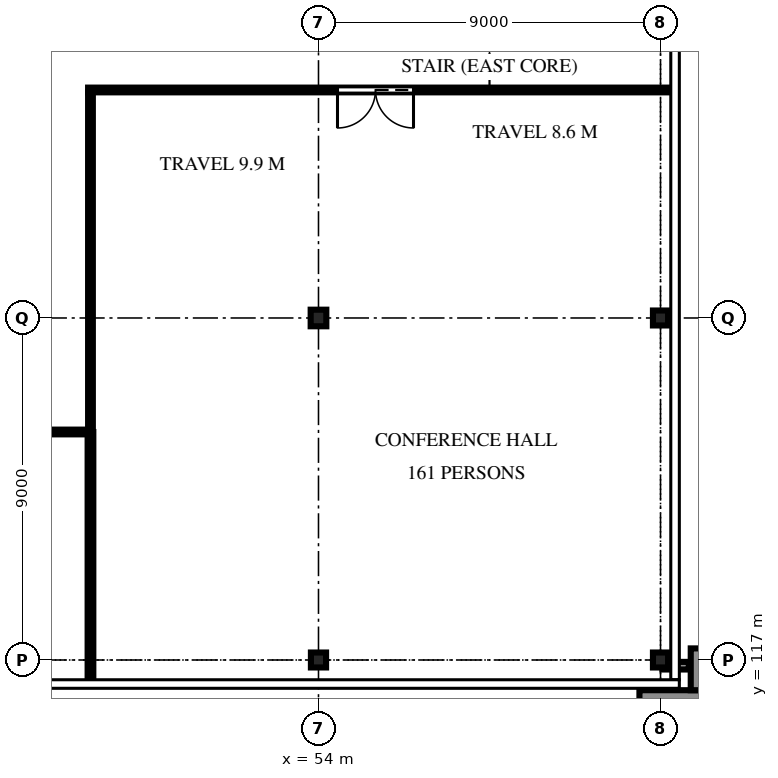
"""IFC4 building model, lengths in metres.
Left out: names, types, materials, properties, quantities, classifications, styles, units other than length and angle.
Written with IfcOpenShell. Run it as: python <this file> out.ifc"""

import sys

from ifc_helpers import new_model, si_unit, direction, frame, frame_2d, origin, origin_2d, place, context, subcontext, project, spatial, polyline, rectangle, i_section, outline, extrude, element, fill, save


model = new_model("IFC4")
c1 = context("Model", 3, precision=1e-05, world=origin(), true_north=direction((0.0, 1.0)))
c2 = subcontext(c1, "Body", "Model", "MODEL_VIEW")
j1 = project(units=[si_unit("LENGTHUNIT", "METRE"), si_unit("PLANEANGLEUNIT", "RADIAN")], contexts=[c1])
p1 = place(None, origin())
s1 = spatial("IfcSite", under=j1, at=p1, CompositionType="ELEMENT")
p2 = place(p1, origin())
s2 = spatial("IfcBuilding", under=s1, at=p2, CompositionType="ELEMENT")
p3 = place(p2, frame((0.0, 0.0, 7.5)))
s3 = spatial("IfcBuildingStorey", under=s2, at=p3, CompositionType="ELEMENT", Elevation=7.5)
p4 = place(p3, frame((54.0, 117.0, 0.0), z_axis=(0.0, 0.0, 1.0), x_axis=(1.0, 0.0, 0.0)))
e1 = element("IfcColumn", 1, at=p4, inside=s3, PredefinedType="COLUMN", context=c2, shape_type="SweptSolid", body=[
    extrude(i_section(OverallWidth=0.399, OverallDepth=0.394, WebThickness=0.016, FlangeThickness=0.025, FilletRadius=0.015, at=origin_2d()), origin(), (0.0, 0.0, 1.0), 4.2),
])
p5 = place(p3, frame((54.0, 126.0, 0.0), z_axis=(0.0, 0.0, 1.0), x_axis=(1.0, 0.0, 0.0)))
e2 = element("IfcColumn", 2, at=p5, inside=s3, PredefinedType="COLUMN", context=c2, shape_type="SweptSolid", body=[
    extrude(i_section(OverallWidth=0.412, OverallDepth=0.437, WebThickness=0.036, FlangeThickness=0.058, FilletRadius=0.015, at=origin_2d()), origin(), (0.0, 0.0, 1.0), 4.2),
])
for number, where, z_axis, x_axis in (
    (3, (63.0, 117.0, 0.0), (0.0, 0.0, 1.0), (1.0, 0.0, 0.0)),
    (4, (63.0, 126.0, 0.0), (0.0, 0.0, 1.0), (1.0, 0.0, 0.0)),
):
    element("IfcColumn", number, at=place(p3, frame(where, z_axis=z_axis, x_axis=x_axis)), inside=s3, PredefinedType="COLUMN", context=c2, shape_type="SweptSolid", body=[
        extrude(i_section(OverallWidth=0.399, OverallDepth=0.394, WebThickness=0.016, FlangeThickness=0.025, FilletRadius=0.015, at=origin_2d()), origin(), (0.0, 0.0, 1.0), 4.2),
    ])
p6 = place(p3, frame((63.05, 116.85, 0.9), z_axis=(0.0, 0.0, 1.0), x_axis=(1.0, 0.0, 0.0)))
e5 = element("IfcWall", 5, at=p6, inside=s3, PredefinedType="PARAPET", context=c2, shape_type="SweptSolid", body=[
    extrude(outline(polyline([(0.0, 0.0), (0.695, 0.0), (0.695, 1.2), (0.0, 1.2), (0.0, 0.0)])), frame((0.0, 0.1, 0.0), z_axis=(0.0, -1.0, 0.0), x_axis=(1.0, 0.0, 0.0)), (0.0, 0.0, 1.0), 0.2),
])
p7 = place(p3, frame((62.445, 115.38, 0.0), z_axis=(0.0, 0.0, 1.0), x_axis=(1.0, 0.0, 0.0)))
e6 = element("IfcWall", 6, at=p7, inside=s3, PredefinedType="SOLIDWALL", context=c2, shape_type="SweptSolid", body=[
    extrude(rectangle(XDim=3.0, YDim=1.65, at=frame_2d((1.5, 0.0))), origin(), (0.0, 0.0, 1.0), 4.2),
])
p8 = place(p3, frame((64.62, 116.205, 0.0), z_axis=(0.0, 0.0, 1.0), x_axis=(0.0, 1.0, 0.0)))
e7 = element("IfcWall", 7, at=p8, inside=s3, PredefinedType="SOLIDWALL", context=c2, shape_type="SweptSolid", body=[
    extrude(rectangle(XDim=1.1, YDim=1.65, at=frame_2d((0.55, 0.0))), origin(), (0.0, 0.0, 1.0), 4.2),
])
p9 = place(p3, frame((47.925, 123.0, 0.0), z_axis=(0.0, 0.0, 1.0), x_axis=(-1.0, 0.0, 0.0)))
e8 = element("IfcWall", 8, at=p9, inside=s3, PredefinedType="PARTITIONING", context=c2, shape_type="SweptSolid", body=[
    extrude(rectangle(XDim=13.925, YDim=0.125, at=frame_2d((6.962, 0.0))), origin(), (0.0, 0.0, 1.0), 3.307),
])
p10 = place(p9, frame((6.4, 0.0, 0.0)))
e9 = element("IfcOpeningElement", 9, at=p10, cuts=e8, PredefinedType="OPENING", context=c2, shape_type="SweptSolid", body=[
    extrude(rectangle(XDim=1.05, YDim=2.1, at=frame_2d((0.525, 1.05))), frame((0.0, 0.073, 0.0), z_axis=(0.0, -1.0, 0.0), x_axis=(1.0, 0.0, 0.0)), (0.0, 0.0, 1.0), 0.145),
])
p11 = place(p3, frame((63.3, 132.0, 0.0), z_axis=(0.0, 0.0, 1.0), x_axis=(-1.0, 0.0, 0.0)))
e10 = element("IfcWall", 10, at=p11, inside=s3, PredefinedType="PARTITIONING", context=c2, shape_type="SweptSolid", body=[
    extrude(rectangle(XDim=15.363, YDim=0.125, at=frame_2d((7.681, 0.0))), origin(), (0.0, 0.0, 1.0), 3.307),
])
p12 = place(p11, frame((6.8, 0.0, 0.0)))
e11 = element("IfcOpeningElement", 11, at=p12, cuts=e10, PredefinedType="OPENING", context=c2, shape_type="SweptSolid", body=[
    extrude(rectangle(XDim=2.0, YDim=2.4, at=frame_2d((1.0, 1.2))), frame((0.0, 0.073, 0.0), z_axis=(0.0, -1.0, 0.0), x_axis=(1.0, 0.0, 0.0)), (0.0, 0.0, 1.0), 0.145),
])
p13 = place(p3, frame((48.0, 131.938, 0.0), z_axis=(0.0, 0.0, 1.0), x_axis=(0.0, -1.0, 0.0)))
e12 = element("IfcWall", 12, at=p13, inside=s3, PredefinedType="PARTITIONING", context=c2, shape_type="SweptSolid", body=[
    extrude(rectangle(XDim=8.938, YDim=0.125, at=frame_2d((4.469, 0.0))), origin(), (0.0, 0.0, 1.0), 3.307),
])
p14 = place(p3, frame((48.0, 116.45, 0.0), z_axis=(0.0, 0.0, 1.0), x_axis=(0.0, 1.0, 0.0)))
e13 = element("IfcWall", 13, at=p14, inside=s3, PredefinedType="PARTITIONING", context=c2, shape_type="SweptSolid", body=[
    extrude(rectangle(XDim=6.55, YDim=0.15, at=frame_2d((3.275, 0.0))), origin(), (0.0, 0.0, 1.0), 3.307),
])
p15 = place(p12, origin())
e14 = element("IfcDoor", 14, at=p15, inside=s3, OperationType="DOUBLE_DOOR_SINGLE_SWING", PredefinedType="DOOR", context=c2, shape_type="SweptSolid", body=[
    extrude(outline(polyline([(0.0, 0.0), (0.07, 0.0), (0.07, 2.33), (1.93, 2.33), (1.93, 0.0), (2.0, 0.0), (2.0, 2.4), (0.0, 2.4), (0.0, 0.0)])), frame((0.0, 0.025, 0.0), z_axis=(0.0, -1.0, 0.0), x_axis=(1.0, 0.0, 0.0)), (0.0, 0.0, 1.0), 0.05),
    extrude(outline(polyline([(0.074, 0.01), (0.997, 0.01), (0.997, 2.326), (0.074, 2.326), (0.074, 0.01)]), holes=[polyline([(0.194, 0.16), (0.877, 0.16), (0.877, 1.01), (0.194, 1.01), (0.194, 0.16)]), polyline([(0.385, 1.16), (0.686, 1.16), (0.686, 1.76), (0.385, 1.76), (0.385, 1.16)])]), frame((0.0, 0.017, 0.0), z_axis=(0.0, -1.0, 0.0), x_axis=(1.0, 0.0, 0.0)), (0.0, 0.0, 1.0), 0.035),
    extrude(rectangle(XDim=0.683, YDim=0.85, at=frame_2d((0.536, 0.585))), frame((0.0, 0.009, 0.0), z_axis=(0.0, -1.0, 0.0), x_axis=(1.0, 0.0, 0.0)), (0.0, 0.0, 1.0), 0.017),
    extrude(rectangle(XDim=0.3, YDim=0.6, at=frame_2d((0.536, 1.46))), frame((0.0, 0.006, 0.0), z_axis=(0.0, -1.0, 0.0), x_axis=(1.0, 0.0, 0.0)), (0.0, 0.0, 1.0), 0.012),
    extrude(outline(polyline([(1.003, 0.01), (1.926, 0.01), (1.926, 2.326), (1.003, 2.326), (1.003, 0.01)]), holes=[polyline([(1.123, 0.16), (1.806, 0.16), (1.806, 1.01), (1.123, 1.01), (1.123, 0.16)]), polyline([(1.314, 1.16), (1.615, 1.16), (1.615, 1.76), (1.314, 1.76), (1.314, 1.16)])]), frame((0.0, 0.017, 0.0), z_axis=(0.0, -1.0, 0.0), x_axis=(1.0, 0.0, 0.0)), (0.0, 0.0, 1.0), 0.035),
    extrude(rectangle(XDim=0.683, YDim=0.85, at=frame_2d((1.464, 0.585))), frame((0.0, 0.009, 0.0), z_axis=(0.0, -1.0, 0.0), x_axis=(1.0, 0.0, 0.0)), (0.0, 0.0, 1.0), 0.017),
    extrude(rectangle(XDim=0.3, YDim=0.6, at=frame_2d((1.464, 1.46))), frame((0.0, 0.006, 0.0), z_axis=(0.0, -1.0, 0.0), x_axis=(1.0, 0.0, 0.0)), (0.0, 0.0, 1.0), 0.012),
])
fill(e11, e14)
save(model, sys.argv[1])
